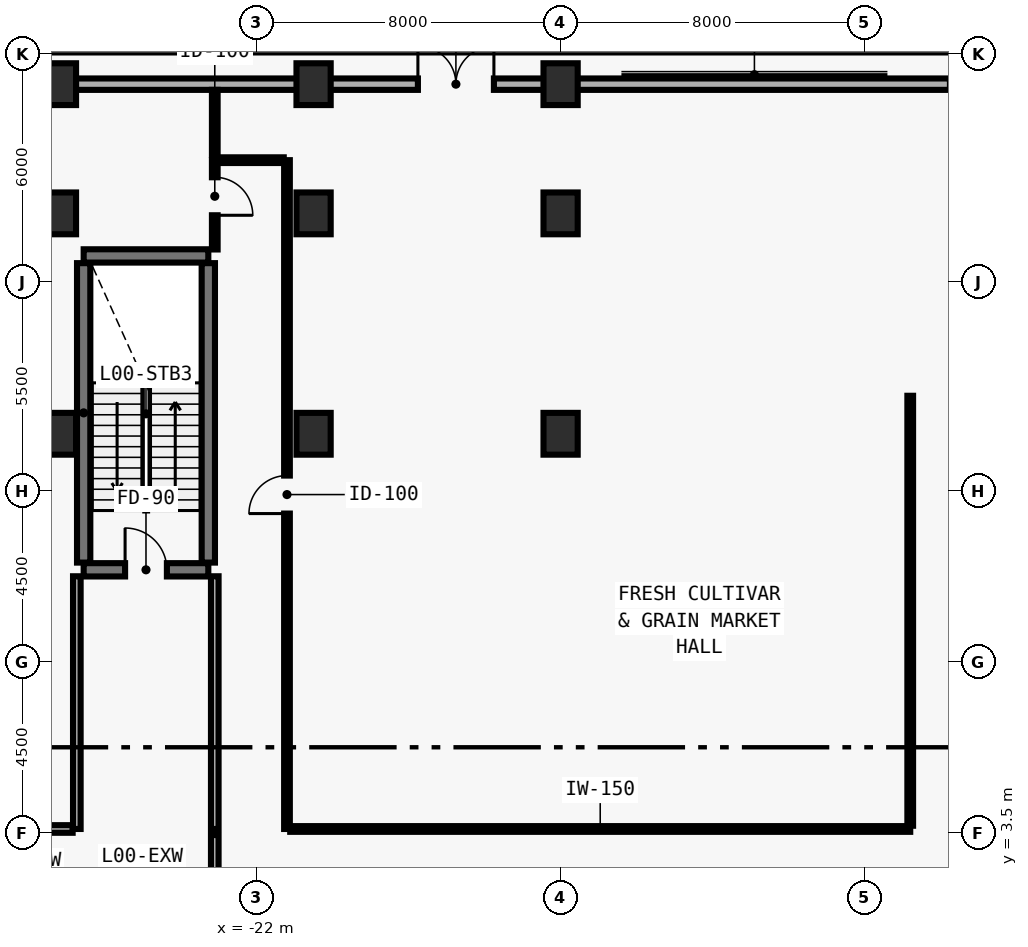
"""IFC4 building model, lengths in metres.
Left out: names, types, materials, properties, quantities, classifications, styles, units other than length and angle.
Written with IfcOpenShell. Run it as: python <this file> out.ifc"""

import sys

from ifc_helpers import new_model, si_unit, direction, frame, frame_2d, origin, origin_2d, place, context, subcontext, project, spatial, rectangle, extrude, element, fill, save


model = new_model("IFC4")
c1 = context("Model", 3, precision=1e-05, world=origin(), true_north=direction((0.0, 1.0)))
c2 = subcontext(c1, "Body", "Model", "MODEL_VIEW")
j1 = project(units=[si_unit("LENGTHUNIT", "METRE"), si_unit("PLANEANGLEUNIT", "RADIAN")], contexts=[c1])
p1 = place(None, origin())
s1 = spatial("IfcSite", under=j1, at=p1, CompositionType="ELEMENT")
p2 = place(p1, origin())
s2 = spatial("IfcBuilding", under=s1, at=p2, CompositionType="ELEMENT")
p3 = place(p2, origin())
s3 = spatial("IfcBuildingStorey", under=s2, at=p3, CompositionType="ELEMENT", Elevation=0.0)
p4 = place(p3, frame((-26.55, 10.42, 0.0), z_axis=(0.0, 0.0, 1.0), x_axis=(1.0, 0.0, 0.0)))
e1 = element("IfcWall", 1, at=p4, inside=s3, PredefinedType="SHEAR", context=c2, shape_type="SweptSolid", body=[
    extrude(rectangle(XDim=3.28, YDim=0.35, at=frame_2d((1.64, 0.0))), origin(), (0.0, 0.0, 1.0), 4.592),
])
p5 = place(p4, frame((1.09, 0.0, 0.0)))
e2 = element("IfcOpeningElement", 2, at=p5, cuts=e1, PredefinedType="OPENING", context=c2, shape_type="SweptSolid", body=[
    extrude(rectangle(XDim=1.1, YDim=2.15, at=frame_2d((0.55, 1.075))), frame((0.0, 0.185, 0.0), z_axis=(0.0, -1.0, 0.0), x_axis=(1.0, 0.0, 0.0)), (0.0, 0.0, 1.0), 0.37),
])
p6 = place(p3, frame((-26.55, 18.68, 0.0), z_axis=(0.0, 0.0, 1.0), x_axis=(1.0, 0.0, 0.0)))
e3 = element("IfcWall", 3, at=p6, inside=s3, PredefinedType="SHEAR", context=c2, shape_type="SweptSolid", body=[
    extrude(rectangle(XDim=3.28, YDim=0.35, at=frame_2d((1.64, 0.0))), origin(), (0.0, 0.0, 1.0), 4.592),
])
for number, where, z_axis, x_axis in (
    (4, (-26.55, 10.61, 0.0), (0.0, 0.0, 1.0), (0.0, 1.0, 0.0)),
    (5, (-23.27, 10.61, 0.0), (0.0, 0.0, 1.0), (0.0, 1.0, 0.0)),
):
    element("IfcWall", number, at=place(p3, frame(where, z_axis=z_axis, x_axis=x_axis)), inside=s3, PredefinedType="SHEAR", context=c2, shape_type="SweptSolid", body=[
        extrude(rectangle(XDim=7.88, YDim=0.35, at=frame_2d((3.94, 0.0))), origin(), (0.0, 0.0, 1.0), 4.592),
    ])
for number, where, z_axis, x_axis in (
    (6, (-27.2, 14.0, 0.0), (0.0, 0.0, 1.0), (1.0, 0.0, 0.0)),
    (7, (-27.2, 19.8, 0.0), (0.0, 0.0, 1.0), (1.0, 0.0, 0.0)),
    (8, (-27.2, 23.2, 0.0), (0.0, 0.0, 1.0), (1.0, 0.0, 0.0)),
    (9, (-20.5, 14.0, 0.0), (0.0, 0.0, 1.0), (1.0, 0.0, 0.0)),
    (10, (-20.5, 19.8, 0.0), (0.0, 0.0, 1.0), (1.0, 0.0, 0.0)),
    (11, (-20.5, 23.2, 0.0), (0.0, 0.0, 1.0), (1.0, 0.0, 0.0)),
    (12, (-14.0, 14.0, 0.0), (0.0, 0.0, 1.0), (1.0, 0.0, 0.0)),
    (13, (-14.0, 19.8, 0.0), (0.0, 0.0, 1.0), (1.0, 0.0, 0.0)),
    (14, (-14.0, 23.2, 0.0), (0.0, 0.0, 1.0), (1.0, 0.0, 0.0)),
):
    element("IfcColumn", number, at=place(p3, frame(where, z_axis=z_axis, x_axis=x_axis)), inside=s3, PredefinedType="COLUMN", context=c2, shape_type="SweptSolid", body=[
        extrude(rectangle(XDim=0.9, YDim=1.1, at=origin_2d()), origin(), (0.0, 0.0, 1.0), 4.575),
    ])
p7 = place(p3, frame((-32.755, 23.2, 0.0), z_axis=(0.0, 0.0, 1.0), x_axis=(1.0, 0.0, 0.0)))
e15 = element("IfcWall", 15, at=p7, inside=s3, PredefinedType="SOLIDWALL", context=c2, shape_type="SweptSolid", body=[
    extrude(rectangle(XDim=65.51, YDim=0.3, at=frame_2d((32.755, 0.0))), origin(), (0.0, 0.0, 1.0), 3.35),
])
p8 = place(p7, frame((15.0, 0.0, 0.0)))
e16 = element("IfcOpeningElement", 16, at=p8, cuts=e15, PredefinedType="OPENING", context=c2, shape_type="SweptSolid", body=[
    extrude(rectangle(XDim=2.0, YDim=2.4, at=frame_2d((1.0, 1.2))), frame((0.0, 0.16, 0.0), z_axis=(0.0, -1.0, 0.0), x_axis=(1.0, 0.0, 0.0)), (0.0, 0.0, 1.0), 0.32),
])
p9 = place(p7, frame((35.0, 0.0, 0.0)))
e17 = element("IfcOpeningElement", 17, at=p9, cuts=e15, PredefinedType="OPENING", context=c2, shape_type="SweptSolid", body=[
    extrude(rectangle(XDim=2.0, YDim=2.4, at=frame_2d((1.0, 1.2))), frame((0.0, 0.16, 0.0), z_axis=(0.0, -1.0, 0.0), x_axis=(1.0, 0.0, 0.0)), (0.0, 0.0, 1.0), 0.32),
])
p10 = place(p7, frame((29.0, 0.0, 0.85)))
e18 = element("IfcOpeningElement", 18, at=p10, cuts=e15, PredefinedType="OPENING", context=c2, shape_type="SweptSolid", body=[
    extrude(rectangle(XDim=3.0, YDim=2.1, at=frame_2d((1.5, 1.05))), frame((0.0, 0.16, 0.0), z_axis=(0.0, -1.0, 0.0), x_axis=(1.0, 0.0, 0.0)), (0.0, 0.0, 1.0), 0.32),
])
p11 = place(p3, frame((-23.1, 21.2, 0.0), z_axis=(0.0, 0.0, 1.0), x_axis=(0.0, -1.0, 0.0)))
e19 = element("IfcWall", 19, at=p11, inside=s3, PredefinedType="PARTITIONING", context=c2, shape_type="SweptSolid", body=[
    extrude(rectangle(XDim=2.35, YDim=0.15, at=frame_2d((1.175, 0.0))), origin(), (0.0, 0.0, 1.0), 4.28),
])
p12 = place(p11, frame((0.45, 0.0, 0.0)))
e20 = element("IfcOpeningElement", 20, at=p12, cuts=e19, PredefinedType="OPENING", context=c2, shape_type="SweptSolid", body=[
    extrude(rectangle(XDim=1.0, YDim=2.1, at=frame_2d((0.5, 1.05))), frame((0.0, 0.085, 0.0), z_axis=(0.0, -1.0, 0.0), x_axis=(1.0, 0.0, 0.0)), (0.0, 0.0, 1.0), 0.17),
])
p13 = place(p3, frame((-21.2, 3.6, 0.0), z_axis=(0.0, 0.0, 1.0), x_axis=(0.0, 1.0, 0.0)))
e21 = element("IfcWall", 21, at=p13, inside=s3, PredefinedType="PARTITIONING", context=c2, shape_type="SweptSolid", body=[
    extrude(rectangle(XDim=17.6, YDim=0.15, at=frame_2d((8.8, 0.0))), origin(), (0.0, 0.0, 1.0), 3.562),
])
p14 = place(p13, frame((8.3, 0.0, 0.0)))
e22 = element("IfcOpeningElement", 22, at=p14, cuts=e21, PredefinedType="OPENING", context=c2, shape_type="SweptSolid", body=[
    extrude(rectangle(XDim=1.0, YDim=2.1, at=frame_2d((0.5, 1.05))), frame((0.0, 0.085, 0.0), z_axis=(0.0, -1.0, 0.0), x_axis=(1.0, 0.0, 0.0)), (0.0, 0.0, 1.0), 0.17),
])
p15 = place(p3, frame((-23.1, 10.25, 0.0), z_axis=(0.0, 0.0, 1.0), x_axis=(0.0, -1.0, 0.0)))
e23 = element("IfcWall", 23, at=p15, inside=s3, PredefinedType="MOVABLE", context=c2, shape_type="SweptSolid", body=[
    extrude(rectangle(XDim=6.65, YDim=0.2, at=frame_2d((3.325, 0.0))), origin(), (0.0, 0.0, 1.0), 4.28),
])
p16 = place(p3, frame((-23.1, 3.44, 0.0), z_axis=(0.0, 0.0, 1.0), x_axis=(0.0, -1.0, 0.0)))
e24 = element("IfcWall", 24, at=p16, inside=s3, PredefinedType="MOVABLE", context=c2, shape_type="SweptSolid", body=[
    extrude(rectangle(XDim=2.43, YDim=0.2, at=frame_2d((1.215, 0.0))), origin(), (0.0, 0.0, 1.0), 4.28),
])
p17 = place(p3, frame((-4.8, 3.6, 0.0), z_axis=(0.0, 0.0, 1.0), x_axis=(-1.0, 0.0, 0.0)))
e25 = element("IfcWall", 25, at=p17, inside=s3, PredefinedType="PARTITIONING", context=c2, shape_type="SweptSolid", body=[
    extrude(rectangle(XDim=16.315, YDim=0.15, at=frame_2d((8.157, 0.0))), origin(), (0.0, 0.0, 1.0), 4.28),
])
p18 = place(p3, frame((-4.8, 15.0, 0.0), z_axis=(0.0, 0.0, 1.0), x_axis=(0.0, -1.0, 0.0)))
e26 = element("IfcWall", 26, at=p18, inside=s3, PredefinedType="PARTITIONING", context=c2, shape_type="SweptSolid", body=[
    extrude(rectangle(XDim=11.315, YDim=0.15, at=frame_2d((5.657, 0.0))), origin(), (0.0, 0.0, 1.0), 4.28),
])
p19 = place(p3, frame((-21.285, 21.2, 0.0), z_axis=(0.0, 0.0, 1.0), x_axis=(-1.0, 0.0, 0.0)))
e27 = element("IfcWall", 27, at=p19, inside=s3, PredefinedType="PARTITIONING", context=c2, shape_type="SweptSolid", body=[
    extrude(rectangle(XDim=1.73, YDim=0.15, at=frame_2d((0.865, 0.0))), origin(), (0.0, 0.0, 1.0), 4.28),
])
p20 = place(p3, frame((-26.73, 10.25, 0.0), z_axis=(0.0, 0.0, 1.0), x_axis=(0.0, -1.0, 0.0)))
e28 = element("IfcWall", 28, at=p20, inside=s3, PredefinedType="MOVABLE", context=c2, shape_type="SweptSolid", body=[
    extrude(rectangle(XDim=6.65, YDim=0.2, at=frame_2d((3.325, 0.0))), origin(), (0.0, 0.0, 1.0), 4.28),
])
p21 = place(p3, frame((-26.84, 3.6, 0.0), z_axis=(0.0, 0.0, 1.0), x_axis=(-1.0, 0.0, 0.0)))
e29 = element("IfcWall", 29, at=p21, inside=s3, PredefinedType="MOVABLE", context=c2, shape_type="SweptSolid", body=[
    extrude(rectangle(XDim=6.21, YDim=0.2, at=frame_2d((3.105, 0.0))), origin(), (0.0, 0.0, 1.0), 4.28),
])
p22 = place(p3, frame((-23.1, 23.05, 0.0), z_axis=(0.0, 0.0, 1.0), x_axis=(0.0, -1.0, 0.0)))
e30 = element("IfcWall", 30, at=p22, inside=s3, PredefinedType="PARTITIONING", context=c2, shape_type="SweptSolid", body=[
    extrude(rectangle(XDim=1.715, YDim=0.15, at=frame_2d((0.857, 0.0))), origin(), (0.0, 0.0, 1.0), 4.28),
])
p23 = place(p8, origin())
e31 = element("IfcDoor", 31, at=p23, inside=s3, OperationType="DOUBLE_DOOR_SINGLE_SWING", PredefinedType="DOOR", context=c2, shape_type="SweptSolid", body=[
    extrude(rectangle(XDim=2.0, YDim=2.4, at=frame_2d((1.0, 1.2))), frame((0.0, 0.025, 0.0), z_axis=(0.0, -1.0, 0.0), x_axis=(1.0, 0.0, 0.0)), (0.0, 0.0, 1.0), 0.05),
])
fill(e16, e31)
p24 = place(p5, origin())
e32 = element("IfcDoor", 32, at=p24, inside=s3, OperationType="SINGLE_SWING_LEFT", PredefinedType="DOOR", context=c2, shape_type="SweptSolid", body=[
    extrude(rectangle(XDim=1.1, YDim=2.15, at=frame_2d((0.55, 1.075))), frame((0.0, 0.025, 0.0), z_axis=(0.0, -1.0, 0.0), x_axis=(1.0, 0.0, 0.0)), (0.0, 0.0, 1.0), 0.05),
])
fill(e2, e32)
p25 = place(p12, origin())
e33 = element("IfcDoor", 33, at=p25, inside=s3, OperationType="SINGLE_SWING_RIGHT", PredefinedType="DOOR", context=c2, shape_type="SweptSolid", body=[
    extrude(rectangle(XDim=1.0, YDim=2.1, at=frame_2d((0.5, 1.05))), frame((0.0, 0.025, 0.0), z_axis=(0.0, -1.0, 0.0), x_axis=(1.0, 0.0, 0.0)), (0.0, 0.0, 1.0), 0.05),
])
fill(e20, e33)
p26 = place(p14, origin())
e34 = element("IfcDoor", 34, at=p26, inside=s3, OperationType="SINGLE_SWING_LEFT", PredefinedType="DOOR", context=c2, shape_type="SweptSolid", body=[
    extrude(rectangle(XDim=1.0, YDim=2.1, at=frame_2d((0.5, 1.05))), frame((0.0, 0.025, 0.0), z_axis=(0.0, -1.0, 0.0), x_axis=(1.0, 0.0, 0.0)), (0.0, 0.0, 1.0), 0.05),
])
fill(e22, e34)
save(model, sys.argv[1])
